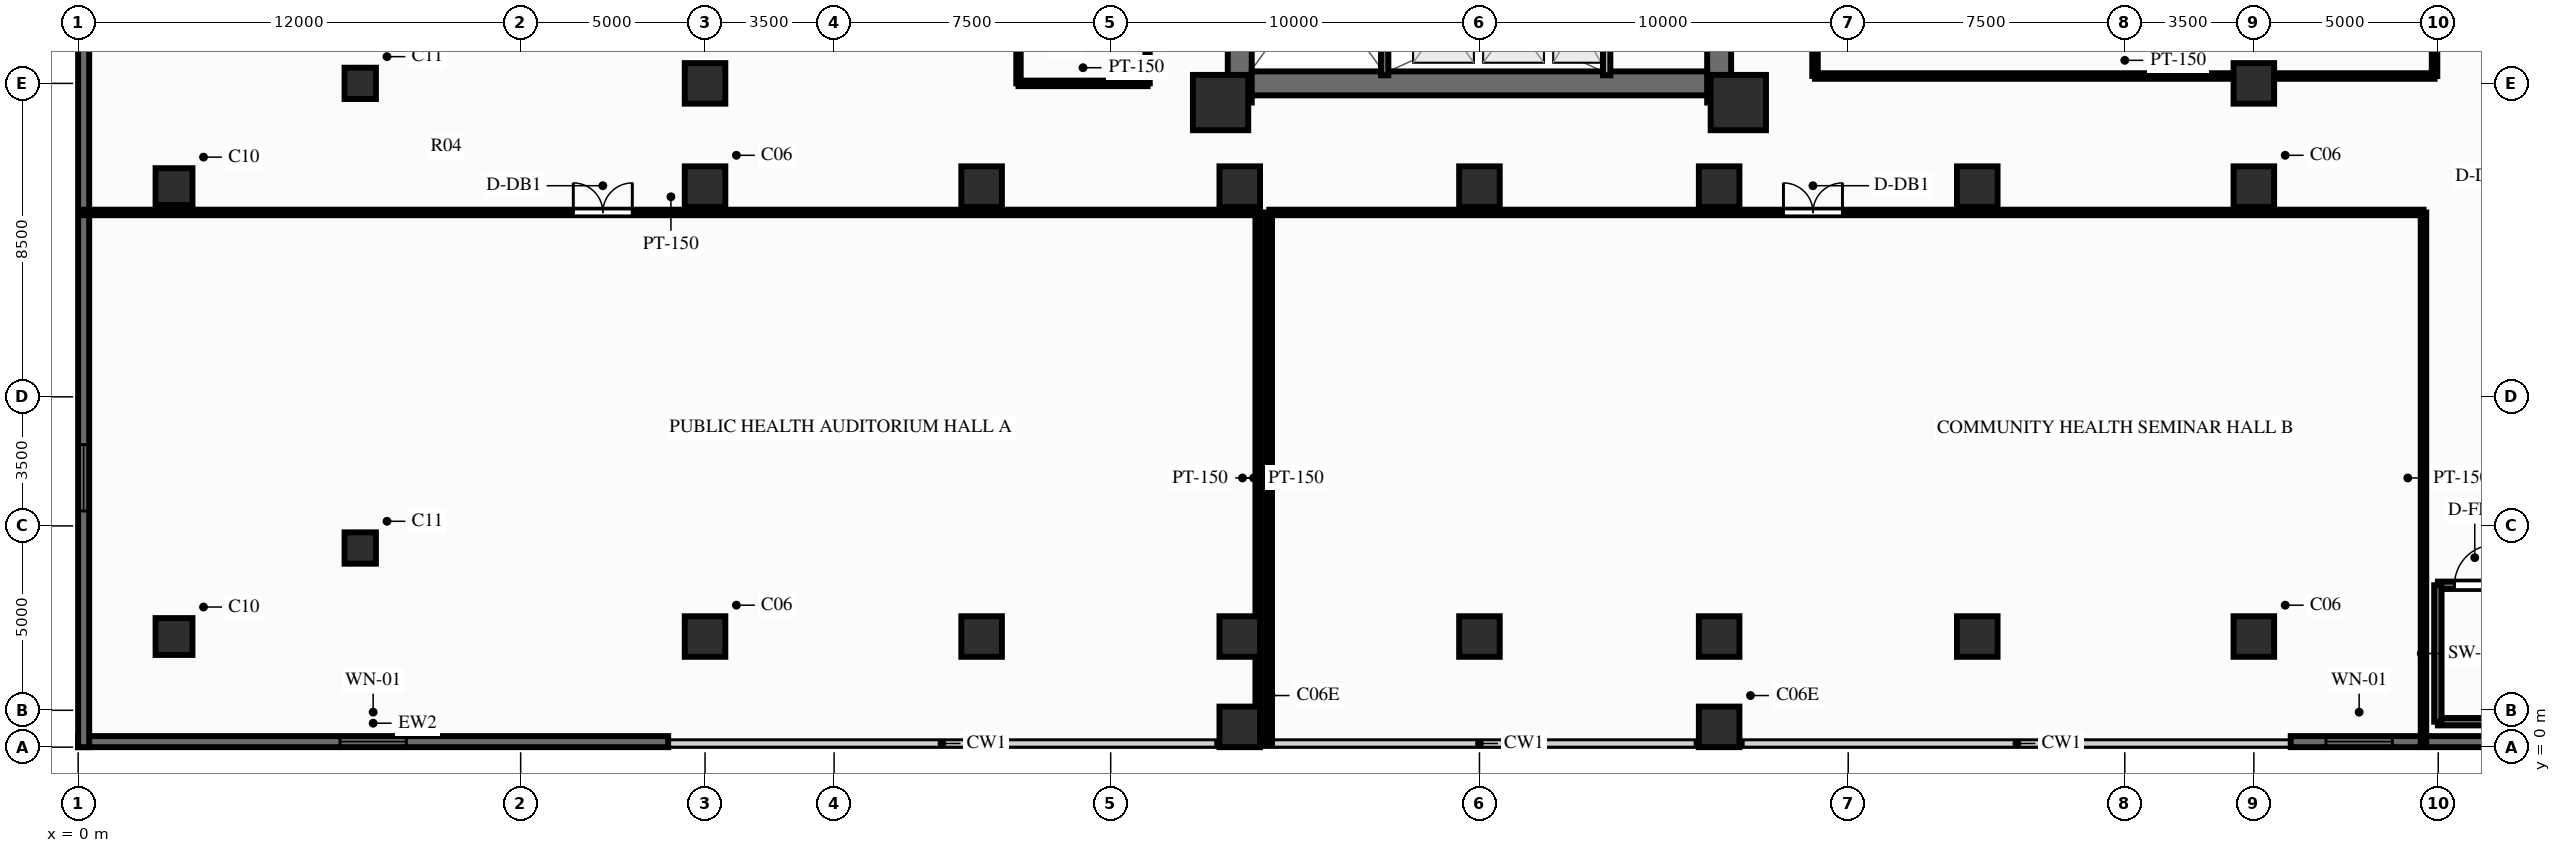
"""IFC4 building model, lengths in metres.
Left out: names, types, materials, properties, quantities, classifications, styles, units other than length and angle.
Written with IfcOpenShell. Run it as: python <this file> out.ifc"""

import sys

from ifc_helpers import new_model, si_unit, direction, frame, frame_2d, origin, origin_2d, place, context, subcontext, project, spatial, rectangle, circle, extrude, source, transform, mapped, element, fill, save


model = new_model("IFC4")
c1 = context("Model", 3, precision=1e-05, world=origin(), true_north=direction((0.0, 1.0)))
c2 = subcontext(c1, "Body", "Model", "MODEL_VIEW")
j1 = project(units=[si_unit("LENGTHUNIT", "METRE"), si_unit("PLANEANGLEUNIT", "RADIAN")], contexts=[c1])
p1 = place(None, origin())
s1 = spatial("IfcSite", under=j1, at=p1, CompositionType="ELEMENT")
p2 = place(p1, origin())
s2 = spatial("IfcBuilding", under=s1, at=p2, CompositionType="ELEMENT")
p3 = place(p2, frame((0.0, 0.0, 15.0)))
s3 = spatial("IfcBuildingStorey", under=s2, at=p3, CompositionType="ELEMENT", Elevation=15.0)
p4 = place(p3, frame((31.5, 17.48, 0.0), z_axis=(0.0, 0.0, 1.0), x_axis=(0.0, 1.0, 0.0)))
e1 = element("IfcWall", 1, at=p4, inside=s3, PredefinedType="SHEAR", context=c2, shape_type="SweptSolid", body=[
    extrude(rectangle(XDim=19.04, YDim=0.65, at=frame_2d((9.52, 0.0))), origin(), (0.0, 0.0, 1.0), 4.4),
])
p5 = place(p4, frame((6.32, 0.0, 0.0)))
e2 = element("IfcOpeningElement", 2, at=p5, cuts=e1, PredefinedType="OPENING", context=c2, shape_type="SweptSolid", body=[
    extrude(rectangle(XDim=1.1, YDim=2.15, at=frame_2d((0.55, 1.075))), frame((0.0, 0.337, 0.0), z_axis=(0.0, -1.0, 0.0), x_axis=(1.0, 0.0, 0.0)), (0.0, 0.0, 1.0), 0.674),
])
p6 = place(p3, frame((44.5, 17.48, 0.0), z_axis=(0.0, 0.0, 1.0), x_axis=(0.0, 1.0, 0.0)))
e3 = element("IfcWall", 3, at=p6, inside=s3, PredefinedType="SHEAR", context=c2, shape_type="SweptSolid", body=[
    extrude(rectangle(XDim=19.04, YDim=0.65, at=frame_2d((9.52, 0.0))), origin(), (0.0, 0.0, 1.0), 4.4),
])
p7 = place(p6, frame((12.67, 0.0, 0.0), z_axis=(0.0, 0.0, 1.0), x_axis=(-1.0, 0.0, 0.0)))
e4 = element("IfcOpeningElement", 4, at=p7, cuts=e3, PredefinedType="OPENING", context=c2, shape_type="SweptSolid", body=[
    extrude(rectangle(XDim=1.1, YDim=2.15, at=frame_2d((0.55, 1.075))), frame((0.0, 0.337, 0.0), z_axis=(0.0, -1.0, 0.0), x_axis=(1.0, 0.0, 0.0)), (0.0, 0.0, 1.0), 0.674),
])
p8 = place(p3, frame((31.825, 18.0, 0.0), z_axis=(0.0, 0.0, 1.0), x_axis=(1.0, 0.0, 0.0)))
e5 = element("IfcWall", 5, at=p8, inside=s3, PredefinedType="SHEAR", context=c2, shape_type="SweptSolid", body=[
    extrude(rectangle(XDim=12.35, YDim=0.65, at=frame_2d((6.175, 0.0))), origin(), (0.0, 0.0, 1.0), 4.4),
])
m1 = source(origin(), c2, "Body", "SweptSolid", [
    extrude(rectangle(XDim=1.5, YDim=1.5, at=origin_2d()), origin(), (0.0, 0.0, 1.0), 4.4),
])
for number, where, z_axis, x_axis in (
    (6, (30.98, 17.48, 0.0), (0.0, 0.0, 1.0), (1.0, 0.0, 0.0)),
    (7, (45.02, 17.48, 0.0), (0.0, 0.0, 1.0), (1.0, 0.0, 0.0)),
):
    element("IfcColumn", number, at=place(p3, frame(where, z_axis=z_axis, x_axis=x_axis)), inside=s3, PredefinedType="COLUMN", context=c2, shape_type="MappedRepresentation", body=[
        mapped(m1, transform((0.0, 0.0, 0.0), scale=1.0)),
    ])
m2 = source(origin(), c2, "Body", "SweptSolid", [
    extrude(circle(Radius=0.5, at=origin_2d()), origin(), (0.0, 0.0, 1.0), 4.4),
])
for number, where, z_axis, x_axis in (
    (8, (2.6, 3.0, 0.0), (0.0, 0.0, 1.0), (1.0, 0.0, 0.0)),
    (9, (2.6, 15.2, 0.0), (0.0, 0.0, 1.0), (1.0, 0.0, 0.0)),
):
    element("IfcColumn", number, at=place(p3, frame(where, z_axis=z_axis, x_axis=x_axis)), inside=s3, PredefinedType="COLUMN", context=c2, shape_type="MappedRepresentation", body=[
        mapped(m2, transform((0.0, 0.0, 0.0), scale=1.0)),
    ])
m3 = source(origin(), c2, "Body", "SweptSolid", [
    extrude(circle(Radius=0.425, at=origin_2d()), origin(), (0.0, 0.0, 1.0), 4.4),
])
for number, where, z_axis, x_axis in (
    (10, (7.65, 5.4, 0.0), (0.0, 0.0, 1.0), (1.0, 0.0, 0.0)),
    (11, (7.65, 18.0, 0.0), (0.0, 0.0, 1.0), (1.0, 0.0, 0.0)),
):
    element("IfcColumn", number, at=place(p3, frame(where, z_axis=z_axis, x_axis=x_axis)), inside=s3, PredefinedType="COLUMN", context=c2, shape_type="MappedRepresentation", body=[
        mapped(m3, transform((0.0, 0.0, 0.0), scale=1.0)),
    ])
m4 = source(origin(), c2, "Body", "SweptSolid", [
    extrude(rectangle(XDim=1.1, YDim=1.1, at=origin_2d()), origin(), (0.0, 0.0, 1.0), 4.4),
])
for number, where, z_axis, x_axis in (
    (12, (17.0, 3.0, 0.0), (0.0, 0.0, 1.0), (1.0, 0.0, 0.0)),
    (13, (59.0, 3.0, 0.0), (0.0, 0.0, 1.0), (1.0, 0.0, 0.0)),
    (14, (17.0, 15.2, 0.0), (0.0, 0.0, 1.0), (1.0, 0.0, 0.0)),
    (15, (59.0, 15.2, 0.0), (0.0, 0.0, 1.0), (1.0, 0.0, 0.0)),
    (16, (17.0, 18.0, 0.0), (0.0, 0.0, 1.0), (1.0, 0.0, 0.0)),
    (17, (59.0, 18.0, 0.0), (0.0, 0.0, 1.0), (1.0, 0.0, 0.0)),
    (18, (24.5, 3.0, 0.0), (0.0, 0.0, 1.0), (1.0, 0.0, 0.0)),
    (19, (24.5, 15.2, 0.0), (0.0, 0.0, 1.0), (1.0, 0.0, 0.0)),
    (20, (31.5, 0.55, 0.0), (0.0, 0.0, 1.0), (1.0, 0.0, 0.0)),
    (21, (31.5, 3.0, 0.0), (0.0, 0.0, 1.0), (1.0, 0.0, 0.0)),
    (22, (31.5, 15.2, 0.0), (0.0, 0.0, 1.0), (1.0, 0.0, 0.0)),
    (23, (38.0, 3.0, 0.0), (0.0, 0.0, 1.0), (1.0, 0.0, 0.0)),
    (24, (38.0, 15.2, 0.0), (0.0, 0.0, 1.0), (1.0, 0.0, 0.0)),
    (25, (44.5, 0.55, 0.0), (0.0, 0.0, 1.0), (1.0, 0.0, 0.0)),
    (26, (44.5, 3.0, 0.0), (0.0, 0.0, 1.0), (1.0, 0.0, 0.0)),
    (27, (44.5, 15.2, 0.0), (0.0, 0.0, 1.0), (1.0, 0.0, 0.0)),
    (28, (51.5, 3.0, 0.0), (0.0, 0.0, 1.0), (1.0, 0.0, 0.0)),
    (29, (51.5, 15.2, 0.0), (0.0, 0.0, 1.0), (1.0, 0.0, 0.0)),
):
    element("IfcColumn", number, at=place(p3, frame(where, z_axis=z_axis, x_axis=x_axis)), inside=s3, PredefinedType="COLUMN", context=c2, shape_type="MappedRepresentation", body=[
        mapped(m4, transform((0.0, 0.0, 0.0), scale=1.0)),
    ])
p9 = place(p3, frame((0.0, 0.15, 0.0), z_axis=(0.0, 0.0, 1.0), x_axis=(1.0, 0.0, 0.0)))
e30 = element("IfcWall", 30, at=p9, inside=s3, PredefinedType="SOLIDWALL", context=c2, shape_type="SweptSolid", body=[
    extrude(rectangle(XDim=16.0, YDim=0.3, at=frame_2d((8.0, 0.0))), origin(), (0.0, 0.0, 1.0), 2.98),
])
p10 = place(p9, frame((7.1, 0.0, 0.85)))
e31 = element("IfcOpeningElement", 31, at=p10, cuts=e30, PredefinedType="OPENING", context=c2, shape_type="SweptSolid", body=[
    extrude(rectangle(XDim=1.8, YDim=1.65, at=frame_2d((0.9, 0.825))), frame((0.0, 0.162, 0.0), z_axis=(0.0, -1.0, 0.0), x_axis=(1.0, 0.0, 0.0)), (0.0, 0.0, 1.0), 0.324),
])
p11 = place(p3, frame((60.0, 0.15, 0.0), z_axis=(0.0, 0.0, 1.0), x_axis=(1.0, 0.0, 0.0)))
e32 = element("IfcWall", 32, at=p11, inside=s3, PredefinedType="SOLIDWALL", context=c2, shape_type="SweptSolid", body=[
    extrude(rectangle(XDim=16.0, YDim=0.3, at=frame_2d((8.0, 0.0))), origin(), (0.0, 0.0, 1.0), 2.98),
])
p12 = place(p11, frame((0.955, 0.0, 0.85)))
e33 = element("IfcOpeningElement", 33, at=p12, cuts=e32, PredefinedType="OPENING", context=c2, shape_type="SweptSolid", body=[
    extrude(rectangle(XDim=1.8, YDim=1.65, at=frame_2d((0.9, 0.825))), frame((0.0, 0.162, 0.0), z_axis=(0.0, -1.0, 0.0), x_axis=(1.0, 0.0, 0.0)), (0.0, 0.0, 1.0), 0.324),
])
p13 = place(p11, frame((6.705, 0.0, 0.85)))
e34 = element("IfcOpeningElement", 34, at=p13, cuts=e32, PredefinedType="OPENING", context=c2, shape_type="SweptSolid", body=[
    extrude(rectangle(XDim=1.8, YDim=1.65, at=frame_2d((0.9, 0.825))), frame((0.0, 0.162, 0.0), z_axis=(0.0, -1.0, 0.0), x_axis=(1.0, 0.0, 0.0)), (0.0, 0.0, 1.0), 0.324),
])
p14 = place(p11, frame((12.85, 0.0, 0.85)))
e35 = element("IfcOpeningElement", 35, at=p14, cuts=e32, PredefinedType="OPENING", context=c2, shape_type="SweptSolid", body=[
    extrude(rectangle(XDim=1.8, YDim=1.65, at=frame_2d((0.9, 0.825))), frame((0.0, 0.162, 0.0), z_axis=(0.0, -1.0, 0.0), x_axis=(1.0, 0.0, 0.0)), (0.0, 0.0, 1.0), 0.324),
])
p15 = place(p3, frame((0.15, 0.0, 0.0), z_axis=(0.0, 0.0, 1.0), x_axis=(0.0, 1.0, 0.0)))
e36 = element("IfcWall", 36, at=p15, inside=s3, PredefinedType="SOLIDWALL", context=c2, shape_type="SweptSolid", body=[
    extrude(rectangle(XDim=54.0, YDim=0.3, at=frame_2d((27.0, 0.0))), origin(), (0.0, 0.0, 1.0), 2.98),
])
p16 = place(p15, frame((6.405, 0.0, 0.85)))
e37 = element("IfcOpeningElement", 37, at=p16, cuts=e36, PredefinedType="OPENING", context=c2, shape_type="SweptSolid", body=[
    extrude(rectangle(XDim=1.8, YDim=1.65, at=frame_2d((0.9, 0.825))), frame((0.0, 0.162, 0.0), z_axis=(0.0, -1.0, 0.0), x_axis=(1.0, 0.0, 0.0)), (0.0, 0.0, 1.0), 0.324),
])
p17 = place(p15, frame((26.045, 0.0, 0.85)))
e38 = element("IfcOpeningElement", 38, at=p17, cuts=e36, PredefinedType="OPENING", context=c2, shape_type="SweptSolid", body=[
    extrude(rectangle(XDim=1.8, YDim=1.65, at=frame_2d((0.9, 0.825))), frame((0.0, 0.162, 0.0), z_axis=(0.0, -1.0, 0.0), x_axis=(1.0, 0.0, 0.0)), (0.0, 0.0, 1.0), 0.324),
])
p18 = place(p3, frame((41.45, 18.22, 0.0), z_axis=(0.0, 0.0, 1.0), x_axis=(0.0, 1.0, 0.0)))
e39 = element("IfcWall", 39, at=p18, inside=s3, PredefinedType="PARTITIONING", context=c2, shape_type="SweptSolid", body=[
    extrude(rectangle(XDim=2.96, YDim=0.2, at=frame_2d((1.48, 0.0))), origin(), (0.0, 0.0, 1.0), 4.08),
])
p19 = place(p3, frame((35.43, 18.22, 0.0), z_axis=(0.0, 0.0, 1.0), x_axis=(0.0, 1.0, 0.0)))
e40 = element("IfcWall", 40, at=p19, inside=s3, PredefinedType="SOLIDWALL", context=c2, shape_type="SweptSolid", body=[
    extrude(rectangle(XDim=7.22, YDim=0.2, at=frame_2d((3.61, 0.0))), origin(), (0.0, 0.0, 1.0), 4.19),
])
p20 = place(p19, frame((6.68, 0.0, 0.0), z_axis=(0.0, 0.0, 1.0), x_axis=(-1.0, 0.0, 0.0)))
e41 = element("IfcOpeningElement", 41, at=p20, cuts=e40, PredefinedType="OPENING", context=c2, shape_type="SweptSolid", body=[
    extrude(rectangle(XDim=1.1, YDim=2.15, at=frame_2d((0.55, 1.075))), frame((0.0, 0.112, 0.0), z_axis=(0.0, -1.0, 0.0), x_axis=(1.0, 0.0, 0.0)), (0.0, 0.0, 1.0), 0.224),
])
p21 = place(p3, frame((63.99, 0.69, 0.0), z_axis=(0.0, 0.0, 1.0), x_axis=(1.0, 0.0, 0.0)))
e42 = element("IfcWall", 42, at=p21, inside=s3, PredefinedType="SOLIDWALL", context=c2, shape_type="SweptSolid", body=[
    extrude(rectangle(XDim=7.62, YDim=0.2, at=frame_2d((3.81, 0.0))), origin(), (0.0, 0.0, 1.0), 4.19),
])
p22 = place(p3, frame((63.99, 4.39, 0.0), z_axis=(0.0, 0.0, 1.0), x_axis=(1.0, 0.0, 0.0)))
e43 = element("IfcWall", 43, at=p22, inside=s3, PredefinedType="SOLIDWALL", context=c2, shape_type="SweptSolid", body=[
    extrude(rectangle(XDim=7.62, YDim=0.2, at=frame_2d((3.81, 0.0))), origin(), (0.0, 0.0, 1.0), 4.19),
])
p23 = place(p22, frame((0.45, 0.0, 0.0)))
e44 = element("IfcOpeningElement", 44, at=p23, cuts=e43, PredefinedType="OPENING", context=c2, shape_type="SweptSolid", body=[
    extrude(rectangle(XDim=1.1, YDim=2.15, at=frame_2d((0.55, 1.075))), frame((0.0, 0.112, 0.0), z_axis=(0.0, -1.0, 0.0), x_axis=(1.0, 0.0, 0.0)), (0.0, 0.0, 1.0), 0.224),
])
p24 = place(p3, frame((63.99, 0.69, 0.0), z_axis=(0.0, 0.0, 1.0), x_axis=(0.0, 1.0, 0.0)))
e45 = element("IfcWall", 45, at=p24, inside=s3, PredefinedType="SOLIDWALL", context=c2, shape_type="SweptSolid", body=[
    extrude(rectangle(XDim=3.7, YDim=0.2, at=frame_2d((1.85, 0.0))), origin(), (0.0, 0.0, 1.0), 4.19),
])
p25 = place(p3, frame((25.5, 18.0, 0.0), z_axis=(0.0, 0.0, 1.0), x_axis=(0.0, 1.0, 0.0)))
e46 = element("IfcWall", 46, at=p25, inside=s3, PredefinedType="PARTITIONING", context=c2, shape_type="SweptSolid", body=[
    extrude(rectangle(XDim=18.0, YDim=0.12, at=frame_2d((9.0, 0.0))), origin(), (0.0, 0.0, 1.0), 4.08),
])
p26 = place(p3, frame((29.0, 18.0, 0.0), z_axis=(0.0, 0.0, 1.0), x_axis=(0.0, 1.0, 0.0)))
e47 = element("IfcWall", 47, at=p26, inside=s3, PredefinedType="PARTITIONING", context=c2, shape_type="SweptSolid", body=[
    extrude(rectangle(XDim=4.0, YDim=0.12, at=frame_2d((2.0, 0.0))), origin(), (0.0, 0.0, 1.0), 4.08),
])
p27 = place(p26, frame((1.55, 0.0, 0.0)))
e48 = element("IfcOpeningElement", 48, at=p27, cuts=e47, PredefinedType="OPENING", context=c2, shape_type="SweptSolid", body=[
    extrude(rectangle(XDim=0.9, YDim=2.1, at=frame_2d((0.45, 1.05))), frame((0.0, 0.072, 0.0), z_axis=(0.0, -1.0, 0.0), x_axis=(1.0, 0.0, 0.0)), (0.0, 0.0, 1.0), 0.144),
])
p28 = place(p3, frame((25.5, 18.0, 0.0), z_axis=(0.0, 0.0, 1.0), x_axis=(1.0, 0.0, 0.0)))
e49 = element("IfcWall", 49, at=p28, inside=s3, PredefinedType="PARTITIONING", context=c2, shape_type="SweptSolid", body=[
    extrude(rectangle(XDim=3.5, YDim=0.15, at=frame_2d((1.75, 0.0))), origin(), (0.0, 0.0, 1.0), 2.94),
])
p29 = place(p3, frame((0.15, 14.5, 0.0), z_axis=(0.0, 0.0, 1.0), x_axis=(1.0, 0.0, 0.0)))
e50 = element("IfcWall", 50, at=p29, inside=s3, PredefinedType="PARTITIONING", context=c2, shape_type="SweptSolid", body=[
    extrude(rectangle(XDim=31.85, YDim=0.15, at=frame_2d((15.925, 0.0))), origin(), (0.0, 0.0, 1.0), 4.08),
])
p30 = place(p29, frame((13.278, 0.0, 0.0)))
e51 = element("IfcOpeningElement", 51, at=p30, cuts=e50, PredefinedType="OPENING", context=c2, shape_type="SweptSolid", body=[
    extrude(rectangle(XDim=1.6, YDim=2.15, at=frame_2d((0.8, 1.075))), frame((0.0, 0.087, 0.0), z_axis=(0.0, -1.0, 0.0), x_axis=(1.0, 0.0, 0.0)), (0.0, 0.0, 1.0), 0.174),
])
p31 = place(p3, frame((32.0, 0.1, 0.0), z_axis=(0.0, 0.0, 1.0), x_axis=(0.0, 1.0, 0.0)))
e52 = element("IfcWall", 52, at=p31, inside=s3, PredefinedType="PARTITIONING", context=c2, shape_type="SweptSolid", body=[
    extrude(rectangle(XDim=14.4, YDim=0.15, at=frame_2d((7.2, 0.0))), origin(), (0.0, 0.0, 1.0), 4.08),
])
p32 = place(p3, frame((32.3, 14.5, 0.0), z_axis=(0.0, 0.0, 1.0), x_axis=(1.0, 0.0, 0.0)))
e53 = element("IfcWall", 53, at=p32, inside=s3, PredefinedType="PARTITIONING", context=c2, shape_type="SweptSolid", body=[
    extrude(rectangle(XDim=31.3, YDim=0.15, at=frame_2d((15.65, 0.0))), origin(), (0.0, 0.0, 1.0), 4.08),
])
p33 = place(p32, frame((13.944, 0.0, 0.0)))
e54 = element("IfcOpeningElement", 54, at=p33, cuts=e53, PredefinedType="OPENING", context=c2, shape_type="SweptSolid", body=[
    extrude(rectangle(XDim=1.6, YDim=2.15, at=frame_2d((0.8, 1.075))), frame((0.0, 0.087, 0.0), z_axis=(0.0, -1.0, 0.0), x_axis=(1.0, 0.0, 0.0)), (0.0, 0.0, 1.0), 0.174),
])
p34 = place(p3, frame((32.3, 0.1, 0.0), z_axis=(0.0, 0.0, 1.0), x_axis=(0.0, 1.0, 0.0)))
e55 = element("IfcWall", 55, at=p34, inside=s3, PredefinedType="PARTITIONING", context=c2, shape_type="SweptSolid", body=[
    extrude(rectangle(XDim=14.4, YDim=0.15, at=frame_2d((7.2, 0.0))), origin(), (0.0, 0.0, 1.0), 4.08),
])
p35 = place(p3, frame((63.6, 0.1, 0.0), z_axis=(0.0, 0.0, 1.0), x_axis=(0.0, 1.0, 0.0)))
e56 = element("IfcWall", 56, at=p35, inside=s3, PredefinedType="PARTITIONING", context=c2, shape_type="SweptSolid", body=[
    extrude(rectangle(XDim=14.4, YDim=0.15, at=frame_2d((7.2, 0.0))), origin(), (0.0, 0.0, 1.0), 2.94),
])
p36 = place(p3, frame((47.1, 18.2, 0.0), z_axis=(0.0, 0.0, 1.0), x_axis=(1.0, 0.0, 0.0)))
e57 = element("IfcWall", 57, at=p36, inside=s3, PredefinedType="PARTITIONING", context=c2, shape_type="SweptSolid", body=[
    extrude(rectangle(XDim=16.8, YDim=0.15, at=frame_2d((8.4, 0.0))), origin(), (0.0, 0.0, 1.0), 4.08),
])
p37 = place(p3, frame((47.1, 18.2, 0.0), z_axis=(0.0, 0.0, 1.0), x_axis=(0.0, 1.0, 0.0)))
e58 = element("IfcWall", 58, at=p37, inside=s3, PredefinedType="PARTITIONING", context=c2, shape_type="SweptSolid", body=[
    extrude(rectangle(XDim=17.6, YDim=0.15, at=frame_2d((8.8, 0.0))), origin(), (0.0, 0.0, 1.0), 4.08),
])
p38 = place(p3, frame((63.9, 18.2, 0.0), z_axis=(0.0, 0.0, 1.0), x_axis=(0.0, 1.0, 0.0)))
e59 = element("IfcWall", 59, at=p38, inside=s3, PredefinedType="PARTITIONING", context=c2, shape_type="SweptSolid", body=[
    extrude(rectangle(XDim=17.6, YDim=0.15, at=frame_2d((8.8, 0.0))), origin(), (0.0, 0.0, 1.0), 4.08),
])
p39 = place(p38, frame((7.756, 0.0, 0.0)))
e60 = element("IfcOpeningElement", 60, at=p39, cuts=e59, PredefinedType="OPENING", context=c2, shape_type="SweptSolid", body=[
    extrude(rectangle(XDim=1.1, YDim=2.15, at=frame_2d((0.55, 1.075))), frame((0.0, 0.087, 0.0), z_axis=(0.0, -1.0, 0.0), x_axis=(1.0, 0.0, 0.0)), (0.0, 0.0, 1.0), 0.174),
])
m5 = source(origin(), c2, "Body", "SweptSolid", [
    extrude(rectangle(XDim=1.8, YDim=1.65, at=frame_2d((0.9, 0.825))), frame((0.0, 0.03, 0.0), z_axis=(0.0, -1.0, 0.0), x_axis=(1.0, 0.0, 0.0)), (0.0, 0.0, 1.0), 0.06),
])
p40 = place(p10, origin())
e61 = element("IfcWindow", 61, at=p40, inside=s3, PartitioningType="SINGLE_PANEL", PredefinedType="WINDOW", context=c2, shape_type="MappedRepresentation", body=[
    mapped(m5, transform((0.0, 0.0, 0.0), scale=1.0)),
])
fill(e31, e61)
p41 = place(p12, origin())
e62 = element("IfcWindow", 62, at=p41, inside=s3, PartitioningType="SINGLE_PANEL", PredefinedType="WINDOW", context=c2, shape_type="MappedRepresentation", body=[
    mapped(m5, transform((0.0, 0.0, 0.0), scale=1.0)),
])
fill(e33, e62)
p42 = place(p16, origin())
e63 = element("IfcWindow", 63, at=p42, inside=s3, PartitioningType="SINGLE_PANEL", PredefinedType="WINDOW", context=c2, shape_type="MappedRepresentation", body=[
    mapped(m5, transform((0.0, 0.0, 0.0), scale=1.0)),
])
fill(e37, e63)
m6 = source(origin(), c2, "Body", "SweptSolid", [
    extrude(rectangle(XDim=1.1, YDim=2.15, at=frame_2d((0.55, 1.075))), frame((0.0, 0.025, 0.0), z_axis=(0.0, -1.0, 0.0), x_axis=(1.0, 0.0, 0.0)), (0.0, 0.0, 1.0), 0.05),
])
p43 = place(p23, origin())
e64 = element("IfcDoor", 64, at=p43, inside=s3, OperationType="SINGLE_SWING_RIGHT", PredefinedType="DOOR", context=c2, shape_type="MappedRepresentation", body=[
    mapped(m6, transform((0.0, 0.0, 0.0), scale=1.0)),
])
fill(e44, e64)
m7 = source(origin(), c2, "Body", "SweptSolid", [
    extrude(rectangle(XDim=1.6, YDim=2.15, at=frame_2d((0.8, 1.075))), frame((0.0, 0.025, 0.0), z_axis=(0.0, -1.0, 0.0), x_axis=(1.0, 0.0, 0.0)), (0.0, 0.0, 1.0), 0.05),
])
p44 = place(p30, origin())
e65 = element("IfcDoor", 65, at=p44, inside=s3, OperationType="DOUBLE_SWING_LEFT", PredefinedType="DOOR", context=c2, shape_type="MappedRepresentation", body=[
    mapped(m7, transform((0.0, 0.0, 0.0), scale=1.0)),
])
fill(e51, e65)
p45 = place(p33, origin())
e66 = element("IfcDoor", 66, at=p45, inside=s3, OperationType="DOUBLE_SWING_LEFT", PredefinedType="DOOR", context=c2, shape_type="MappedRepresentation", body=[
    mapped(m7, transform((0.0, 0.0, 0.0), scale=1.0)),
])
fill(e54, e66)
save(model, sys.argv[1])
